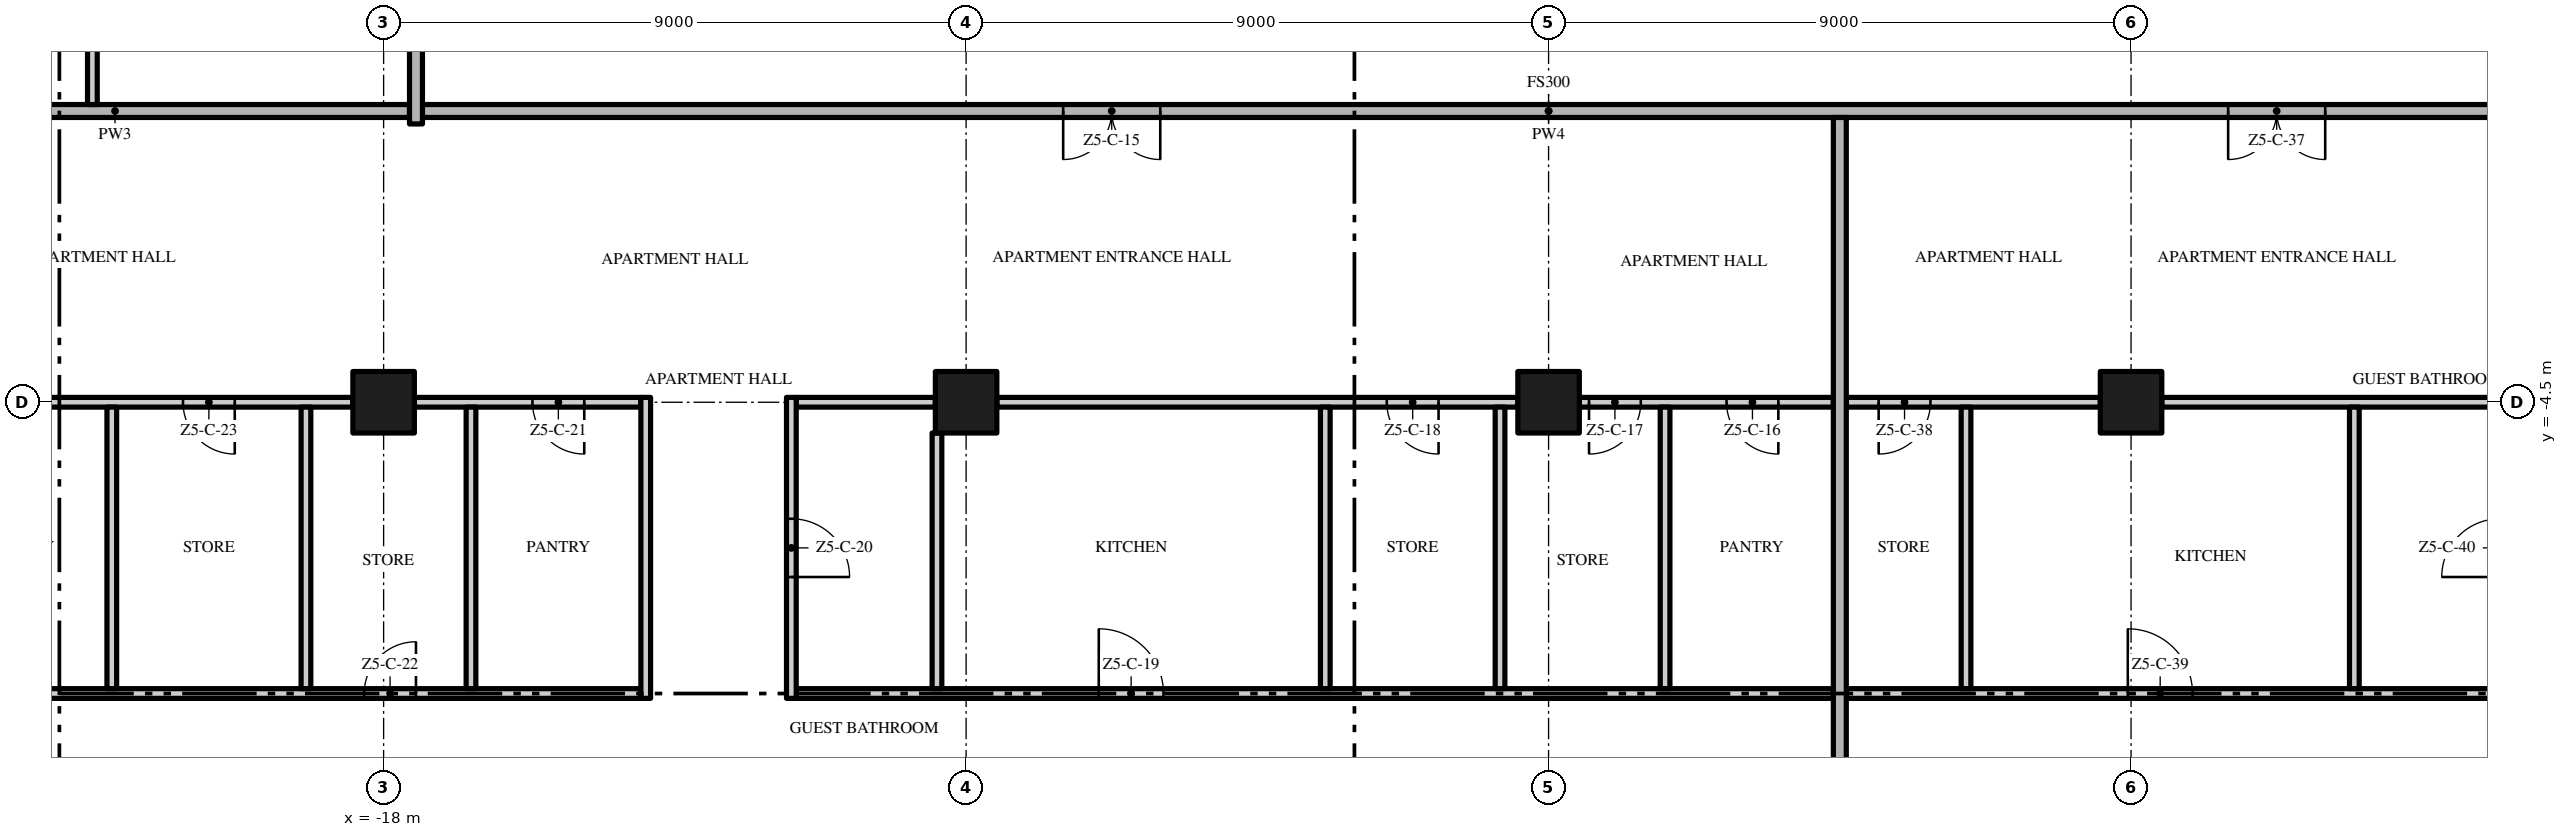
"""IFC4 building model, lengths in metres.
Left out: names, types, materials, properties, quantities, classifications, styles, units other than length and angle.
Written with IfcOpenShell. Run it as: python <this file> out.ifc"""

import sys

from ifc_helpers import new_model, si_unit, direction, frame, frame_2d, origin, origin_2d, place, context, subcontext, project, spatial, rectangle, extrude, element, fill, save


model = new_model("IFC4")
c1 = context("Model", 3, precision=1e-05, world=origin(), true_north=direction((0.0, 1.0)))
c2 = subcontext(c1, "Body", "Model", "MODEL_VIEW")
j1 = project(units=[si_unit("LENGTHUNIT", "METRE"), si_unit("PLANEANGLEUNIT", "RADIAN")], contexts=[c1])
p1 = place(None, origin())
s1 = spatial("IfcSite", under=j1, at=p1, CompositionType="ELEMENT")
p2 = place(p1, origin())
s2 = spatial("IfcBuilding", under=s1, at=p2, CompositionType="ELEMENT")
p3 = place(p2, frame((0.0, 0.0, 269.2)))
s3 = spatial("IfcBuildingStorey", under=s2, at=p3, CompositionType="ELEMENT", Elevation=269.2)
for number, where, z_axis, x_axis in (
    (1, (-18.0, -4.5, 0.0), (0.0, 0.0, 1.0), (1.0, 0.0, 0.0)),
    (2, (-9.0, -4.5, 0.0), (0.0, 0.0, 1.0), (1.0, 0.0, 0.0)),
    (3, (0.0, -4.5, 0.0), (0.0, 0.0, 1.0), (1.0, 0.0, 0.0)),
    (4, (9.0, -4.5, 0.0), (0.0, 0.0, 1.0), (1.0, 0.0, 0.0)),
):
    element("IfcColumn", number, at=place(p3, frame(where, z_axis=z_axis, x_axis=x_axis)), inside=s3, PredefinedType="COLUMN", context=c2, shape_type="SweptSolid", body=[
        extrude(rectangle(XDim=0.95, YDim=0.95, at=origin_2d()), origin(), (0.0, 0.0, 1.0), 3.5),
    ])
p4 = place(p3, frame((-26.7, -9.0, 0.0), z_axis=(0.0, 0.0, 1.0), x_axis=(1.0, 0.0, 0.0)))
e5 = element("IfcWall", 5, at=p4, inside=s3, PredefinedType="PARTITIONING", context=c2, shape_type="SweptSolid", body=[
    extrude(rectangle(XDim=12.675, YDim=0.15, at=frame_2d((6.338, 0.0))), origin(), (0.0, 0.0, 1.0), 3.5),
])
p5 = place(p4, frame((8.4, 0.0, 0.0)))
e6 = element("IfcOpeningElement", 6, at=p5, cuts=e5, PredefinedType="OPENING", context=c2, shape_type="SweptSolid", body=[
    extrude(rectangle(XDim=0.8, YDim=2.0, at=frame_2d((0.4, 1.0))), frame((0.0, 0.085, 0.0), z_axis=(0.0, -1.0, 0.0), x_axis=(1.0, 0.0, 0.0)), (0.0, 0.0, 1.0), 0.17),
])
p6 = place(p4, frame((0.2, 0.0, 0.0)))
e7 = element("IfcOpeningElement", 7, at=p6, cuts=e5, PredefinedType="OPENING", context=c2, shape_type="SweptSolid", body=[
    extrude(rectangle(XDim=0.8, YDim=2.0, at=frame_2d((0.4, 1.0))), frame((0.0, 0.085, 0.0), z_axis=(0.0, -1.0, 0.0), x_axis=(1.0, 0.0, 0.0)), (0.0, 0.0, 1.0), 0.17),
])
p7 = place(p3, frame((-11.625, -9.0, 0.0), z_axis=(0.0, 0.0, 1.0), x_axis=(1.0, 0.0, 0.0)))
e8 = element("IfcWall", 8, at=p7, inside=s3, PredefinedType="PARTITIONING", context=c2, shape_type="SweptSolid", body=[
    extrude(rectangle(XDim=16.025, YDim=0.15, at=frame_2d((8.012, 0.0))), origin(), (0.0, 0.0, 1.0), 3.5),
])
p8 = place(p7, frame((4.675, 0.0, 0.0)))
e9 = element("IfcOpeningElement", 9, at=p8, cuts=e8, PredefinedType="OPENING", context=c2, shape_type="SweptSolid", body=[
    extrude(rectangle(XDim=1.0, YDim=2.4, at=frame_2d((0.5, 1.2))), frame((0.0, 0.085, 0.0), z_axis=(0.0, -1.0, 0.0), x_axis=(1.0, 0.0, 0.0)), (0.0, 0.0, 1.0), 0.17),
])
p9 = place(p3, frame((4.6, -9.0, 0.0), z_axis=(0.0, 0.0, 1.0), x_axis=(1.0, 0.0, 0.0)))
e10 = element("IfcWall", 10, at=p9, inside=s3, PredefinedType="PARTITIONING", context=c2, shape_type="SweptSolid", body=[
    extrude(rectangle(XDim=10.025, YDim=0.15, at=frame_2d((5.013, 0.0))), origin(), (0.0, 0.0, 1.0), 3.5),
])
p10 = place(p9, frame((4.35, 0.0, 0.0)))
e11 = element("IfcOpeningElement", 11, at=p10, cuts=e10, PredefinedType="OPENING", context=c2, shape_type="SweptSolid", body=[
    extrude(rectangle(XDim=1.0, YDim=2.4, at=frame_2d((0.5, 1.2))), frame((0.0, 0.085, 0.0), z_axis=(0.0, -1.0, 0.0), x_axis=(1.0, 0.0, 0.0)), (0.0, 0.0, 1.0), 0.17),
])
p11 = place(p3, frame((-18.475, -4.5, 0.0), z_axis=(0.0, 0.0, 1.0), x_axis=(-1.0, 0.0, 0.0)))
e12 = element("IfcWall", 12, at=p11, inside=s3, PredefinedType="PARTITIONING", context=c2, shape_type="SweptSolid", body=[
    extrude(rectangle(XDim=7.625, YDim=0.15, at=frame_2d((3.812, 0.0))), origin(), (0.0, 0.0, 1.0), 3.5),
])
p12 = place(p11, frame((1.825, 0.0, 0.0)))
e13 = element("IfcOpeningElement", 13, at=p12, cuts=e12, PredefinedType="OPENING", context=c2, shape_type="SweptSolid", body=[
    extrude(rectangle(XDim=0.8, YDim=2.0, at=frame_2d((0.4, 1.0))), frame((0.0, 0.085, 0.0), z_axis=(0.0, -1.0, 0.0), x_axis=(1.0, 0.0, 0.0)), (0.0, 0.0, 1.0), 0.17),
])
p13 = place(p11, frame((4.775, 0.0, 0.0)))
e14 = element("IfcOpeningElement", 14, at=p13, cuts=e12, PredefinedType="OPENING", context=c2, shape_type="SweptSolid", body=[
    extrude(rectangle(XDim=0.9, YDim=2.1, at=frame_2d((0.45, 1.05))), frame((0.0, 0.085, 0.0), z_axis=(0.0, -1.0, 0.0), x_axis=(1.0, 0.0, 0.0)), (0.0, 0.0, 1.0), 0.17),
])
p14 = place(p3, frame((-14.025, -4.5, 0.0), z_axis=(0.0, 0.0, 1.0), x_axis=(-1.0, 0.0, 0.0)))
e15 = element("IfcWall", 15, at=p14, inside=s3, PredefinedType="PARTITIONING", context=c2, shape_type="SweptSolid", body=[
    extrude(rectangle(XDim=3.5, YDim=0.15, at=frame_2d((1.75, 0.0))), origin(), (0.0, 0.0, 1.0), 3.5),
])
p15 = place(p14, frame((0.875, 0.0, 0.0)))
e16 = element("IfcOpeningElement", 16, at=p15, cuts=e15, PredefinedType="OPENING", context=c2, shape_type="SweptSolid", body=[
    extrude(rectangle(XDim=0.8, YDim=2.0, at=frame_2d((0.4, 1.0))), frame((0.0, 0.085, 0.0), z_axis=(0.0, -1.0, 0.0), x_axis=(1.0, 0.0, 0.0)), (0.0, 0.0, 1.0), 0.17),
])
p16 = place(p3, frame((-11.625, -4.5, 0.0), z_axis=(0.0, 0.0, 1.0), x_axis=(1.0, 0.0, 0.0)))
e17 = element("IfcWall", 17, at=p16, inside=s3, PredefinedType="PARTITIONING", context=c2, shape_type="SweptSolid", body=[
    extrude(rectangle(XDim=2.15, YDim=0.15, at=frame_2d((1.075, 0.0))), origin(), (0.0, 0.0, 1.0), 3.5),
])
p17 = place(p3, frame((-0.475, -4.5, 0.0), z_axis=(0.0, 0.0, 1.0), x_axis=(-1.0, 0.0, 0.0)))
e18 = element("IfcWall", 18, at=p17, inside=s3, PredefinedType="PARTITIONING", context=c2, shape_type="SweptSolid", body=[
    extrude(rectangle(XDim=8.05, YDim=0.15, at=frame_2d((4.025, 0.0))), origin(), (0.0, 0.0, 1.0), 3.5),
])
p18 = place(p17, frame((1.225, 0.0, 0.0)))
e19 = element("IfcOpeningElement", 19, at=p18, cuts=e18, PredefinedType="OPENING", context=c2, shape_type="SweptSolid", body=[
    extrude(rectangle(XDim=0.8, YDim=2.0, at=frame_2d((0.4, 1.0))), frame((0.0, 0.085, 0.0), z_axis=(0.0, -1.0, 0.0), x_axis=(1.0, 0.0, 0.0)), (0.0, 0.0, 1.0), 0.17),
])
p19 = place(p3, frame((4.4, -4.5, 0.0), z_axis=(0.0, 0.0, 1.0), x_axis=(-1.0, 0.0, 0.0)))
e20 = element("IfcWall", 20, at=p19, inside=s3, PredefinedType="PARTITIONING", context=c2, shape_type="SweptSolid", body=[
    extrude(rectangle(XDim=3.925, YDim=0.15, at=frame_2d((1.962, 0.0))), origin(), (0.0, 0.0, 1.0), 3.5),
])
p20 = place(p19, frame((0.85, 0.0, 0.0)))
e21 = element("IfcOpeningElement", 21, at=p20, cuts=e20, PredefinedType="OPENING", context=c2, shape_type="SweptSolid", body=[
    extrude(rectangle(XDim=0.8, YDim=2.0, at=frame_2d((0.4, 1.0))), frame((0.0, 0.085, 0.0), z_axis=(0.0, -1.0, 0.0), x_axis=(1.0, 0.0, 0.0)), (0.0, 0.0, 1.0), 0.17),
])
p21 = place(p19, frame((2.975, 0.0, 0.0)))
e22 = element("IfcOpeningElement", 22, at=p21, cuts=e20, PredefinedType="OPENING", context=c2, shape_type="SweptSolid", body=[
    extrude(rectangle(XDim=0.8, YDim=2.0, at=frame_2d((0.4, 1.0))), frame((0.0, 0.085, 0.0), z_axis=(0.0, -1.0, 0.0), x_axis=(1.0, 0.0, 0.0)), (0.0, 0.0, 1.0), 0.17),
])
p22 = place(p3, frame((8.525, -4.5, 0.0), z_axis=(0.0, 0.0, 1.0), x_axis=(-1.0, 0.0, 0.0)))
e23 = element("IfcWall", 23, at=p22, inside=s3, PredefinedType="PARTITIONING", context=c2, shape_type="SweptSolid", body=[
    extrude(rectangle(XDim=3.925, YDim=0.15, at=frame_2d((1.962, 0.0))), origin(), (0.0, 0.0, 1.0), 3.5),
])
p23 = place(p22, frame((2.625, 0.0, 0.0)))
e24 = element("IfcOpeningElement", 24, at=p23, cuts=e23, PredefinedType="OPENING", context=c2, shape_type="SweptSolid", body=[
    extrude(rectangle(XDim=0.8, YDim=2.0, at=frame_2d((0.4, 1.0))), frame((0.0, 0.085, 0.0), z_axis=(0.0, -1.0, 0.0), x_axis=(1.0, 0.0, 0.0)), (0.0, 0.0, 1.0), 0.17),
])
p24 = place(p3, frame((9.475, -4.5, 0.0), z_axis=(0.0, 0.0, 1.0), x_axis=(1.0, 0.0, 0.0)))
e25 = element("IfcWall", 25, at=p24, inside=s3, PredefinedType="PARTITIONING", context=c2, shape_type="SweptSolid", body=[
    extrude(rectangle(XDim=5.15, YDim=0.15, at=frame_2d((2.575, 0.0))), origin(), (0.0, 0.0, 1.0), 3.5),
])
p25 = place(p3, frame((17.4, 0.0, 0.0), z_axis=(0.0, 0.0, 1.0), x_axis=(-1.0, 0.0, 0.0)))
e26 = element("IfcWall", 26, at=p25, inside=s3, PredefinedType="PARTITIONING", context=c2, shape_type="SweptSolid", body=[
    extrude(rectangle(XDim=34.8, YDim=0.2, at=frame_2d((17.4, 0.0))), origin(), (0.0, 0.0, 1.0), 3.5),
])
p26 = place(p25, frame((23.4, 0.0, 0.0)))
e27 = element("IfcOpeningElement", 27, at=p26, cuts=e26, PredefinedType="OPENING", context=c2, shape_type="SweptSolid", body=[
    extrude(rectangle(XDim=1.5, YDim=2.4, at=frame_2d((0.75, 1.2))), frame((0.0, 0.11, 0.0), z_axis=(0.0, -1.0, 0.0), x_axis=(1.0, 0.0, 0.0)), (0.0, 0.0, 1.0), 0.22),
])
p27 = place(p25, frame((5.4, 0.0, 0.0)))
e28 = element("IfcOpeningElement", 28, at=p27, cuts=e26, PredefinedType="OPENING", context=c2, shape_type="SweptSolid", body=[
    extrude(rectangle(XDim=1.5, YDim=2.4, at=frame_2d((0.75, 1.2))), frame((0.0, 0.11, 0.0), z_axis=(0.0, -1.0, 0.0), x_axis=(1.0, 0.0, 0.0)), (0.0, 0.0, 1.0), 0.22),
])
p28 = place(p3, frame((-26.7, 0.0, 0.0), z_axis=(0.0, 0.0, 1.0), x_axis=(1.0, 0.0, 0.0)))
e29 = element("IfcWall", 29, at=p28, inside=s3, PredefinedType="PARTITIONING", context=c2, shape_type="SweptSolid", body=[
    extrude(rectangle(XDim=9.1, YDim=0.2, at=frame_2d((4.55, 0.0))), origin(), (0.0, 0.0, 1.0), 3.5),
])
p29 = place(p3, frame((-22.5, 0.1, 0.0), z_axis=(0.0, 0.0, 1.0), x_axis=(0.0, 1.0, 0.0)))
e30 = element("IfcWall", 30, at=p29, inside=s3, PredefinedType="PARTITIONING", context=c2, shape_type="SweptSolid", body=[
    extrude(rectangle(XDim=17.45, YDim=0.15, at=frame_2d((8.725, 0.0))), origin(), (0.0, 0.0, 1.0), 3.5),
])
p30 = place(p29, frame((1.65, 0.0, 0.0)))
e31 = element("IfcOpeningElement", 31, at=p30, cuts=e30, PredefinedType="OPENING", context=c2, shape_type="SweptSolid", body=[
    extrude(rectangle(XDim=1.0, YDim=2.4, at=frame_2d((0.5, 1.2))), frame((0.0, 0.085, 0.0), z_axis=(0.0, -1.0, 0.0), x_axis=(1.0, 0.0, 0.0)), (0.0, 0.0, 1.0), 0.17),
])
p31 = place(p29, frame((5.0, 0.0, 0.0)))
e32 = element("IfcOpeningElement", 32, at=p31, cuts=e30, PredefinedType="OPENING", context=c2, shape_type="SweptSolid", body=[
    extrude(rectangle(XDim=1.0, YDim=2.4, at=frame_2d((0.5, 1.2))), frame((0.0, 0.085, 0.0), z_axis=(0.0, -1.0, 0.0), x_axis=(1.0, 0.0, 0.0)), (0.0, 0.0, 1.0), 0.17),
])
p32 = place(p29, frame((13.25, 0.0, 0.0)))
e33 = element("IfcOpeningElement", 33, at=p32, cuts=e30, PredefinedType="OPENING", context=c2, shape_type="SweptSolid", body=[
    extrude(rectangle(XDim=1.8, YDim=2.4, at=frame_2d((0.9, 1.2))), frame((0.0, 0.085, 0.0), z_axis=(0.0, -1.0, 0.0), x_axis=(1.0, 0.0, 0.0)), (0.0, 0.0, 1.0), 0.17),
])
for number, where, z_axis, x_axis in (
    (34, (-22.2, -8.925, 0.0), (0.0, 0.0, 1.0), (0.0, 1.0, 0.0)),
    (35, (-19.2, -8.925, 0.0), (0.0, 0.0, 1.0), (0.0, 1.0, 0.0)),
):
    element("IfcWall", number, at=place(p3, frame(where, z_axis=z_axis, x_axis=x_axis)), inside=s3, PredefinedType="PARTITIONING", context=c2, shape_type="SweptSolid", body=[
        extrude(rectangle(XDim=4.35, YDim=0.15, at=frame_2d((2.175, 0.0))), origin(), (0.0, 0.0, 1.0), 3.5),
    ])
p33 = place(p3, frame((-17.5, -0.2, 0.0), z_axis=(0.0, 0.0, 1.0), x_axis=(0.0, 1.0, 0.0)))
e36 = element("IfcWall", 36, at=p33, inside=s3, PredefinedType="PARTITIONING", context=c2, shape_type="SweptSolid", body=[
    extrude(rectangle(XDim=4.225, YDim=0.2, at=frame_2d((2.112, 0.0))), origin(), (0.0, 0.0, 1.0), 3.5),
])
p34 = place(p3, frame((-16.65, -8.925, 0.0), z_axis=(0.0, 0.0, 1.0), x_axis=(0.0, 1.0, 0.0)))
e37 = element("IfcWall", 37, at=p34, inside=s3, PredefinedType="PARTITIONING", context=c2, shape_type="SweptSolid", body=[
    extrude(rectangle(XDim=4.35, YDim=0.15, at=frame_2d((2.175, 0.0))), origin(), (0.0, 0.0, 1.0), 3.5),
])
p35 = place(p3, frame((-13.95, -9.075, 0.0), z_axis=(0.0, 0.0, 1.0), x_axis=(0.0, 1.0, 0.0)))
e38 = element("IfcWall", 38, at=p35, inside=s3, PredefinedType="PARTITIONING", context=c2, shape_type="SweptSolid", body=[
    extrude(rectangle(XDim=4.65, YDim=0.15, at=frame_2d((2.325, 0.0))), origin(), (0.0, 0.0, 1.0), 3.5),
])
p36 = place(p3, frame((-11.7, -4.425, 0.0), z_axis=(0.0, 0.0, 1.0), x_axis=(0.0, -1.0, 0.0)))
e39 = element("IfcWall", 39, at=p36, inside=s3, PredefinedType="PARTITIONING", context=c2, shape_type="SweptSolid", body=[
    extrude(rectangle(XDim=4.65, YDim=0.15, at=frame_2d((2.325, 0.0))), origin(), (0.0, 0.0, 1.0), 3.5),
])
p37 = place(p36, frame((1.875, 0.0, 0.0)))
e40 = element("IfcOpeningElement", 40, at=p37, cuts=e39, PredefinedType="OPENING", context=c2, shape_type="SweptSolid", body=[
    extrude(rectangle(XDim=0.9, YDim=2.1, at=frame_2d((0.45, 1.05))), frame((0.0, 0.085, 0.0), z_axis=(0.0, -1.0, 0.0), x_axis=(1.0, 0.0, 0.0)), (0.0, 0.0, 1.0), 0.17),
])
p38 = place(p3, frame((-9.45, -8.925, 0.0), z_axis=(0.0, 0.0, 1.0), x_axis=(0.0, 1.0, 0.0)))
e41 = element("IfcWall", 41, at=p38, inside=s3, PredefinedType="PARTITIONING", context=c2, shape_type="SweptSolid", body=[
    extrude(rectangle(XDim=3.95, YDim=0.15, at=frame_2d((1.975, 0.0))), origin(), (0.0, 0.0, 1.0), 3.5),
])
for number, where, z_axis, x_axis in (
    (42, (-3.45, -8.925, 0.0), (0.0, 0.0, 1.0), (0.0, 1.0, 0.0)),
    (43, (-0.75, -8.925, 0.0), (0.0, 0.0, 1.0), (0.0, 1.0, 0.0)),
    (44, (1.8, -8.925, 0.0), (0.0, 0.0, 1.0), (0.0, 1.0, 0.0)),
):
    element("IfcWall", number, at=place(p3, frame(where, z_axis=z_axis, x_axis=x_axis)), inside=s3, PredefinedType="PARTITIONING", context=c2, shape_type="SweptSolid", body=[
        extrude(rectangle(XDim=4.35, YDim=0.15, at=frame_2d((2.175, 0.0))), origin(), (0.0, 0.0, 1.0), 3.5),
    ])
p39 = place(p3, frame((4.5, -22.2, 0.0), z_axis=(0.0, 0.0, 1.0), x_axis=(0.0, 1.0, 0.0)))
e45 = element("IfcWall", 45, at=p39, inside=s3, PredefinedType="PARTITIONING", context=c2, shape_type="SweptSolid", body=[
    extrude(rectangle(XDim=22.1, YDim=0.2, at=frame_2d((11.05, 0.0))), origin(), (0.0, 0.0, 1.0), 3.5),
])
for number, where, z_axis, x_axis in (
    (46, (6.45, -8.925, 0.0), (0.0, 0.0, 1.0), (0.0, 1.0, 0.0)),
    (47, (12.45, -8.925, 0.0), (0.0, 0.0, 1.0), (0.0, 1.0, 0.0)),
):
    element("IfcWall", number, at=place(p3, frame(where, z_axis=z_axis, x_axis=x_axis)), inside=s3, PredefinedType="PARTITIONING", context=c2, shape_type="SweptSolid", body=[
        extrude(rectangle(XDim=4.35, YDim=0.15, at=frame_2d((2.175, 0.0))), origin(), (0.0, 0.0, 1.0), 3.5),
    ])
p40 = place(p26, origin())
e48 = element("IfcDoor", 48, at=p40, inside=s3, OperationType="DOUBLE_DOOR_SINGLE_SWING", PredefinedType="DOOR", context=c2, shape_type="SweptSolid", body=[
    extrude(rectangle(XDim=1.5, YDim=2.4, at=frame_2d((0.75, 1.2))), frame((0.0, 0.025, 0.0), z_axis=(0.0, -1.0, 0.0), x_axis=(1.0, 0.0, 0.0)), (0.0, 0.0, 1.0), 0.05),
])
fill(e27, e48)
p41 = place(p20, origin())
e49 = element("IfcDoor", 49, at=p41, inside=s3, OperationType="SINGLE_SWING_LEFT", PredefinedType="DOOR", context=c2, shape_type="SweptSolid", body=[
    extrude(rectangle(XDim=0.8, YDim=2.0, at=frame_2d((0.4, 1.0))), frame((0.0, 0.025, 0.0), z_axis=(0.0, -1.0, 0.0), x_axis=(1.0, 0.0, 0.0)), (0.0, 0.0, 1.0), 0.05),
])
fill(e21, e49)
p42 = place(p21, origin())
e50 = element("IfcDoor", 50, at=p42, inside=s3, OperationType="SINGLE_SWING_RIGHT", PredefinedType="DOOR", context=c2, shape_type="SweptSolid", body=[
    extrude(rectangle(XDim=0.8, YDim=2.0, at=frame_2d((0.4, 1.0))), frame((0.0, 0.025, 0.0), z_axis=(0.0, -1.0, 0.0), x_axis=(1.0, 0.0, 0.0)), (0.0, 0.0, 1.0), 0.05),
])
fill(e22, e50)
p43 = place(p18, origin())
e51 = element("IfcDoor", 51, at=p43, inside=s3, OperationType="SINGLE_SWING_LEFT", PredefinedType="DOOR", context=c2, shape_type="SweptSolid", body=[
    extrude(rectangle(XDim=0.8, YDim=2.0, at=frame_2d((0.4, 1.0))), frame((0.0, 0.025, 0.0), z_axis=(0.0, -1.0, 0.0), x_axis=(1.0, 0.0, 0.0)), (0.0, 0.0, 1.0), 0.05),
])
fill(e19, e51)
p44 = place(p8, origin())
e52 = element("IfcDoor", 52, at=p44, inside=s3, OperationType="SINGLE_SWING_LEFT", PredefinedType="DOOR", context=c2, shape_type="SweptSolid", body=[
    extrude(rectangle(XDim=1.0, YDim=2.4, at=frame_2d((0.5, 1.2))), frame((0.0, 0.025, 0.0), z_axis=(0.0, -1.0, 0.0), x_axis=(1.0, 0.0, 0.0)), (0.0, 0.0, 1.0), 0.05),
])
fill(e9, e52)
p45 = place(p37, origin())
e53 = element("IfcDoor", 53, at=p45, inside=s3, OperationType="SINGLE_SWING_RIGHT", PredefinedType="DOOR", context=c2, shape_type="SweptSolid", body=[
    extrude(rectangle(XDim=0.9, YDim=2.1, at=frame_2d((0.45, 1.05))), frame((0.0, 0.025, 0.0), z_axis=(0.0, -1.0, 0.0), x_axis=(1.0, 0.0, 0.0)), (0.0, 0.0, 1.0), 0.05),
])
fill(e40, e53)
p46 = place(p15, origin())
e54 = element("IfcDoor", 54, at=p46, inside=s3, OperationType="SINGLE_SWING_LEFT", PredefinedType="DOOR", context=c2, shape_type="SweptSolid", body=[
    extrude(rectangle(XDim=0.8, YDim=2.0, at=frame_2d((0.4, 1.0))), frame((0.0, 0.025, 0.0), z_axis=(0.0, -1.0, 0.0), x_axis=(1.0, 0.0, 0.0)), (0.0, 0.0, 1.0), 0.05),
])
fill(e16, e54)
p47 = place(p5, origin())
e55 = element("IfcDoor", 55, at=p47, inside=s3, OperationType="SINGLE_SWING_RIGHT", PredefinedType="DOOR", context=c2, shape_type="SweptSolid", body=[
    extrude(rectangle(XDim=0.8, YDim=2.0, at=frame_2d((0.4, 1.0))), frame((0.0, 0.025, 0.0), z_axis=(0.0, -1.0, 0.0), x_axis=(1.0, 0.0, 0.0)), (0.0, 0.0, 1.0), 0.05),
])
fill(e6, e55)
p48 = place(p12, origin())
e56 = element("IfcDoor", 56, at=p48, inside=s3, OperationType="SINGLE_SWING_LEFT", PredefinedType="DOOR", context=c2, shape_type="SweptSolid", body=[
    extrude(rectangle(XDim=0.8, YDim=2.0, at=frame_2d((0.4, 1.0))), frame((0.0, 0.025, 0.0), z_axis=(0.0, -1.0, 0.0), x_axis=(1.0, 0.0, 0.0)), (0.0, 0.0, 1.0), 0.05),
])
fill(e13, e56)
p49 = place(p27, origin())
e57 = element("IfcDoor", 57, at=p49, inside=s3, OperationType="DOUBLE_DOOR_SINGLE_SWING", PredefinedType="DOOR", context=c2, shape_type="SweptSolid", body=[
    extrude(rectangle(XDim=1.5, YDim=2.4, at=frame_2d((0.75, 1.2))), frame((0.0, 0.025, 0.0), z_axis=(0.0, -1.0, 0.0), x_axis=(1.0, 0.0, 0.0)), (0.0, 0.0, 1.0), 0.05),
])
fill(e28, e57)
p50 = place(p23, origin())
e58 = element("IfcDoor", 58, at=p50, inside=s3, OperationType="SINGLE_SWING_RIGHT", PredefinedType="DOOR", context=c2, shape_type="SweptSolid", body=[
    extrude(rectangle(XDim=0.8, YDim=2.0, at=frame_2d((0.4, 1.0))), frame((0.0, 0.025, 0.0), z_axis=(0.0, -1.0, 0.0), x_axis=(1.0, 0.0, 0.0)), (0.0, 0.0, 1.0), 0.05),
])
fill(e24, e58)
p51 = place(p10, origin())
e59 = element("IfcDoor", 59, at=p51, inside=s3, OperationType="SINGLE_SWING_LEFT", PredefinedType="DOOR", context=c2, shape_type="SweptSolid", body=[
    extrude(rectangle(XDim=1.0, YDim=2.4, at=frame_2d((0.5, 1.2))), frame((0.0, 0.025, 0.0), z_axis=(0.0, -1.0, 0.0), x_axis=(1.0, 0.0, 0.0)), (0.0, 0.0, 1.0), 0.05),
])
fill(e11, e59)
save(model, sys.argv[1])
